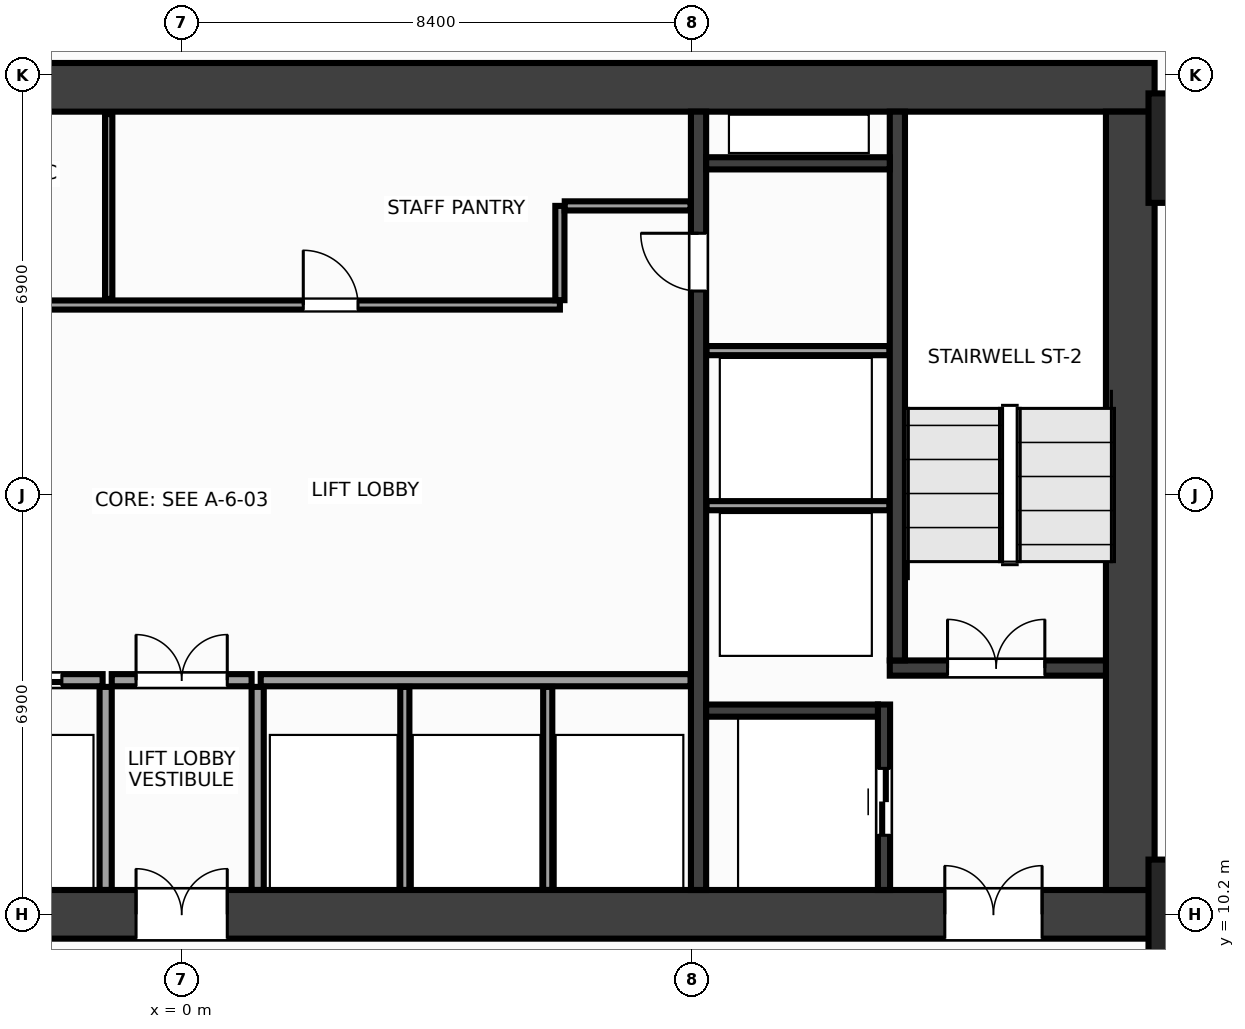
"""IFC4 building model, lengths in metres.
Left out: names, types, materials, properties, quantities, classifications, styles, units other than length and angle.
Written with IfcOpenShell. Run it as: python <this file> out.ifc"""

import sys

from ifc_helpers import new_model, si_unit, direction, frame, frame_2d, origin, origin_2d, place, context, subcontext, project, spatial, rectangle, extrude, source, transform, mapped, element, fill, save


model = new_model("IFC4")
c1 = context("Model", 3, precision=1e-05, world=origin(), true_north=direction((0.0, 1.0)))
c2 = subcontext(c1, "Body", "Model", "MODEL_VIEW")
j1 = project(units=[si_unit("LENGTHUNIT", "METRE"), si_unit("PLANEANGLEUNIT", "RADIAN")], contexts=[c1])
p1 = place(None, origin())
s1 = spatial("IfcSite", under=j1, at=p1, CompositionType="ELEMENT")
p2 = place(p1, origin())
s2 = spatial("IfcBuilding", under=s1, at=p2, CompositionType="ELEMENT")
p3 = place(p2, frame((0.0, 0.0, 63.2)))
s3 = spatial("IfcBuildingStorey", under=s2, at=p3, CompositionType="ELEMENT", Elevation=63.2)
m1 = source(origin(), c2, "Body", "SweptSolid", [
    extrude(rectangle(XDim=32.0, YDim=0.8, at=frame_2d((16.0, 0.0))), origin(), (0.0, 0.0, 1.0), 3.6),
])
p4 = place(p3, frame((-16.0, 23.8, 0.0), z_axis=(0.0, 0.0, 1.0), x_axis=(1.0, 0.0, 0.0)))
e1 = element("IfcWall", 1, at=p4, inside=s3, PredefinedType="SHEAR", context=c2, shape_type="MappedRepresentation", body=[
    mapped(m1, transform((0.0, 0.0, 0.0), x_axis=(1.0, 0.0, 0.0), y_axis=(0.0, 1.0, 0.0), z_axis=(0.0, 0.0, 1.0), scale=1.0)),
])
p5 = place(p3, frame((-16.0, 10.2, 0.0), z_axis=(0.0, 0.0, 1.0), x_axis=(1.0, 0.0, 0.0)))
e2 = element("IfcWall", 2, at=p5, inside=s3, PredefinedType="SHEAR", context=c2, shape_type="MappedRepresentation", body=[
    mapped(m1, transform((0.0, 0.0, 0.0), x_axis=(1.0, 0.0, 0.0), y_axis=(0.0, 1.0, 0.0), z_axis=(0.0, 0.0, 1.0), scale=1.0)),
])
p6 = place(p5, frame((1.85, 0.0, 0.0)))
e3 = element("IfcOpeningElement", 3, at=p6, cuts=e2, PredefinedType="OPENING", context=c2, shape_type="SweptSolid", body=[
    extrude(rectangle(XDim=1.6, YDim=2.15, at=frame_2d((0.8, 1.075))), frame((0.0, 0.412, 0.0), z_axis=(0.0, -1.0, 0.0), x_axis=(1.0, 0.0, 0.0)), (0.0, 0.0, 1.0), 0.824),
])
p7 = place(p5, frame((28.55, 0.0, 0.0)))
e4 = element("IfcOpeningElement", 4, at=p7, cuts=e2, PredefinedType="OPENING", context=c2, shape_type="SweptSolid", body=[
    extrude(rectangle(XDim=1.6, YDim=2.15, at=frame_2d((0.8, 1.075))), frame((0.0, 0.412, 0.0), z_axis=(0.0, -1.0, 0.0), x_axis=(1.0, 0.0, 0.0)), (0.0, 0.0, 1.0), 0.824),
])
p8 = place(p5, frame((15.25, 0.0, 0.0)))
e5 = element("IfcOpeningElement", 5, at=p8, cuts=e2, PredefinedType="OPENING", context=c2, shape_type="SweptSolid", body=[
    extrude(rectangle(XDim=1.5, YDim=2.2, at=frame_2d((0.75, 1.1))), frame((0.0, 0.412, 0.0), z_axis=(0.0, -1.0, 0.0), x_axis=(1.0, 0.0, 0.0)), (0.0, 0.0, 1.0), 0.824),
])
m2 = source(origin(), c2, "Body", "SweptSolid", [
    extrude(rectangle(XDim=12.8, YDim=0.8, at=frame_2d((6.4, 0.0))), origin(), (0.0, 0.0, 1.0), 3.6),
])
p9 = place(p3, frame((15.6, 10.6, 0.0), z_axis=(0.0, 0.0, 1.0), x_axis=(0.0, 1.0, 0.0)))
e6 = element("IfcWall", 6, at=p9, inside=s3, PredefinedType="SHEAR", context=c2, shape_type="MappedRepresentation", body=[
    mapped(m2, transform((0.0, 0.0, 0.0), x_axis=(1.0, 0.0, 0.0), y_axis=(0.0, 1.0, 0.0), z_axis=(0.0, 0.0, 1.0), scale=1.0)),
])
m3 = source(origin(), c2, "Body", "SweptSolid", [
    extrude(rectangle(XDim=12.8, YDim=0.25, at=frame_2d((6.4, 0.0))), origin(), (0.0, 0.0, 1.0), 3.6),
])
p10 = place(p3, frame((8.5, 10.6, 0.0), z_axis=(0.0, 0.0, 1.0), x_axis=(0.0, 1.0, 0.0)))
e7 = element("IfcWall", 7, at=p10, inside=s3, PredefinedType="SHEAR", context=c2, shape_type="MappedRepresentation", body=[
    mapped(m3, transform((0.0, 0.0, 0.0), x_axis=(1.0, 0.0, 0.0), y_axis=(0.0, 1.0, 0.0), z_axis=(0.0, 0.0, 1.0), scale=1.0)),
])
p11 = place(p10, frame((9.85, 0.0, 0.0)))
e8 = element("IfcOpeningElement", 8, at=p11, cuts=e7, PredefinedType="OPENING", context=c2, shape_type="SweptSolid", body=[
    extrude(rectangle(XDim=0.95, YDim=2.15, at=frame_2d((0.475, 1.075))), frame((0.0, 0.137, 0.0), z_axis=(0.0, -1.0, 0.0), x_axis=(1.0, 0.0, 0.0)), (0.0, 0.0, 1.0), 0.274),
])
m4 = source(origin(), c2, "Body", "SweptSolid", [
    extrude(rectangle(XDim=3.555, YDim=0.25, at=frame_2d((1.777, 0.0))), origin(), (0.0, 0.0, 1.0), 3.6),
])
p12 = place(p3, frame((11.645, 14.25, 0.0), z_axis=(0.0, 0.0, 1.0), x_axis=(1.0, 0.0, 0.0)))
e9 = element("IfcWall", 9, at=p12, inside=s3, PredefinedType="SHEAR", context=c2, shape_type="MappedRepresentation", body=[
    mapped(m4, transform((0.0, 0.0, 0.0), x_axis=(1.0, 0.0, 0.0), y_axis=(0.0, 1.0, 0.0), z_axis=(0.0, 0.0, 1.0), scale=1.0)),
])
p13 = place(p12, frame((0.95, 0.0, 0.0)))
e10 = element("IfcOpeningElement", 10, at=p13, cuts=e9, PredefinedType="OPENING", context=c2, shape_type="SweptSolid", body=[
    extrude(rectangle(XDim=1.6, YDim=2.15, at=frame_2d((0.8, 1.075))), frame((0.0, 0.137, 0.0), z_axis=(0.0, -1.0, 0.0), x_axis=(1.0, 0.0, 0.0)), (0.0, 0.0, 1.0), 0.274),
])
m5 = source(origin(), c2, "Body", "SweptSolid", [
    extrude(rectangle(XDim=9.025, YDim=0.25, at=frame_2d((4.512, 0.0))), origin(), (0.0, 0.0, 1.0), 3.6),
])
p14 = place(p3, frame((11.77, 14.375, 0.0), z_axis=(0.0, 0.0, 1.0), x_axis=(0.0, 1.0, 0.0)))
e11 = element("IfcWall", 11, at=p14, inside=s3, PredefinedType="SHEAR", context=c2, shape_type="MappedRepresentation", body=[
    mapped(m5, transform((0.0, 0.0, 0.0), x_axis=(1.0, 0.0, 0.0), y_axis=(0.0, 1.0, 0.0), z_axis=(0.0, 0.0, 1.0), scale=1.0)),
])
m6 = source(origin(), c2, "Body", "SweptSolid", [
    extrude(rectangle(XDim=3.05, YDim=0.2, at=frame_2d((1.525, 0.0))), origin(), (0.0, 0.0, 1.0), 3.6),
])
p15 = place(p3, frame((11.55, 10.6, 0.0), z_axis=(0.0, 0.0, 1.0), x_axis=(0.0, 1.0, 0.0)))
e12 = element("IfcWall", 12, at=p15, inside=s3, PredefinedType="SHEAR", context=c2, shape_type="MappedRepresentation", body=[
    mapped(m6, transform((0.0, 0.0, 0.0), x_axis=(1.0, 0.0, 0.0), y_axis=(0.0, 1.0, 0.0), z_axis=(0.0, 0.0, 1.0), scale=1.0)),
])
p16 = place(p15, frame((0.9, 0.0, 0.0)))
e13 = element("IfcOpeningElement", 13, at=p16, cuts=e12, PredefinedType="OPENING", context=c2, shape_type="SweptSolid", body=[
    extrude(rectangle(XDim=1.1, YDim=2.15, at=frame_2d((0.55, 1.075))), frame((0.0, 0.112, 0.0), z_axis=(0.0, -1.0, 0.0), x_axis=(1.0, 0.0, 0.0)), (0.0, 0.0, 1.0), 0.224),
])
m7 = source(origin(), c2, "Body", "SweptSolid", [
    extrude(rectangle(XDim=2.825, YDim=0.2, at=frame_2d((1.413, 0.0))), origin(), (0.0, 0.0, 1.0), 3.6),
])
p17 = place(p3, frame((8.625, 13.55, 0.0), z_axis=(0.0, 0.0, 1.0), x_axis=(1.0, 0.0, 0.0)))
e14 = element("IfcWall", 14, at=p17, inside=s3, PredefinedType="SHEAR", context=c2, shape_type="MappedRepresentation", body=[
    mapped(m7, transform((0.0, 0.0, 0.0), x_axis=(1.0, 0.0, 0.0), y_axis=(0.0, 1.0, 0.0), z_axis=(0.0, 0.0, 1.0), scale=1.0)),
])
m8 = source(origin(), c2, "Body", "SweptSolid", [
    extrude(rectangle(XDim=3.02, YDim=0.2, at=frame_2d((1.51, 0.0))), origin(), (0.0, 0.0, 1.0), 3.6),
])
p18 = place(p3, frame((8.625, 22.55, 0.0), z_axis=(0.0, 0.0, 1.0), x_axis=(1.0, 0.0, 0.0)))
e15 = element("IfcWall", 15, at=p18, inside=s3, PredefinedType="SHEAR", context=c2, shape_type="MappedRepresentation", body=[
    mapped(m8, transform((0.0, 0.0, 0.0), x_axis=(1.0, 0.0, 0.0), y_axis=(0.0, 1.0, 0.0), z_axis=(0.0, 0.0, 1.0), scale=1.0)),
])
m9 = source(origin(), c2, "Body", "SweptSolid", [
    extrude(rectangle(XDim=1.8, YDim=1.8, at=origin_2d()), origin(), (0.0, 0.0, 1.0), 3.6),
])
for number, where, z_axis, x_axis in (
    (16, (16.8, 10.2, 0.0), (0.0, 0.0, 1.0), (1.0, 0.0, 0.0)),
    (17, (16.8, 22.8, 0.0), (0.0, 0.0, 1.0), (1.0, 0.0, 0.0)),
):
    element("IfcColumn", number, at=place(p3, frame(where, z_axis=z_axis, x_axis=x_axis)), inside=s3, PredefinedType="COLUMN", context=c2, shape_type="MappedRepresentation", body=[
        mapped(m9, transform((0.0, 0.0, 0.0), x_axis=(1.0, 0.0, 0.0), y_axis=(0.0, 1.0, 0.0), z_axis=(0.0, 0.0, 1.0), scale=1.0)),
    ])
m10 = source(origin(), c2, "Body", "SweptSolid", [
    extrude(rectangle(XDim=3.01, YDim=0.15, at=frame_2d((1.505, 0.0))), origin(), (0.0, 0.0, 1.0), 3.36),
])
for number, where, z_axis, x_axis in (
    (18, (8.63, 16.92, 0.0), (0.0, 0.0, 1.0), (1.0, 0.0, 0.0)),
    (19, (8.63, 19.47, 0.0), (0.0, 0.0, 1.0), (1.0, 0.0, 0.0)),
):
    element("IfcWall", number, at=place(p3, frame(where, z_axis=z_axis, x_axis=x_axis)), inside=s3, PredefinedType="PARTITIONING", context=c2, shape_type="MappedRepresentation", body=[
        mapped(m10, transform((0.0, 0.0, 0.0), x_axis=(1.0, 0.0, 0.0), y_axis=(0.0, 1.0, 0.0), z_axis=(0.0, 0.0, 1.0), scale=1.0)),
    ])
m11 = source(origin(), c2, "Body", "SweptSolid", [
    extrude(rectangle(XDim=7.07, YDim=0.2, at=frame_2d((3.535, 0.0))), origin(), (0.0, 0.0, 1.0), 3.36),
])
p19 = place(p3, frame((-8.37, 14.05, 0.0), z_axis=(0.0, 0.0, 1.0), x_axis=(1.0, 0.0, 0.0)))
e20 = element("IfcWall", 20, at=p19, inside=s3, PredefinedType="PARTITIONING", context=c2, shape_type="MappedRepresentation", body=[
    mapped(m11, transform((0.0, 0.0, 0.0), x_axis=(1.0, 0.0, 0.0), y_axis=(0.0, 1.0, 0.0), z_axis=(0.0, 0.0, 1.0), scale=1.0)),
])
p20 = place(p19, frame((0.6, 0.0, 0.0)))
e21 = element("IfcOpeningElement", 21, at=p20, cuts=e20, PredefinedType="OPENING", context=c2, shape_type="SweptSolid", body=[
    extrude(rectangle(XDim=1.1, YDim=2.15, at=frame_2d((0.55, 1.075))), frame((0.0, 0.112, 0.0), z_axis=(0.0, -1.0, 0.0), x_axis=(1.0, 0.0, 0.0)), (0.0, 0.0, 1.0), 0.224),
])
p21 = place(p19, frame((2.95, 0.0, 0.0)))
e22 = element("IfcOpeningElement", 22, at=p21, cuts=e20, PredefinedType="OPENING", context=c2, shape_type="SweptSolid", body=[
    extrude(rectangle(XDim=1.1, YDim=2.15, at=frame_2d((0.55, 1.075))), frame((0.0, 0.112, 0.0), z_axis=(0.0, -1.0, 0.0), x_axis=(1.0, 0.0, 0.0)), (0.0, 0.0, 1.0), 0.224),
])
p22 = place(p19, frame((5.3, 0.0, 0.0)))
e23 = element("IfcOpeningElement", 23, at=p22, cuts=e20, PredefinedType="OPENING", context=c2, shape_type="SweptSolid", body=[
    extrude(rectangle(XDim=1.1, YDim=2.15, at=frame_2d((0.55, 1.075))), frame((0.0, 0.112, 0.0), z_axis=(0.0, -1.0, 0.0), x_axis=(1.0, 0.0, 0.0)), (0.0, 0.0, 1.0), 0.224),
])
p23 = place(p3, frame((1.3, 14.05, 0.0), z_axis=(0.0, 0.0, 1.0), x_axis=(1.0, 0.0, 0.0)))
e24 = element("IfcWall", 24, at=p23, inside=s3, PredefinedType="PARTITIONING", context=c2, shape_type="MappedRepresentation", body=[
    mapped(m11, transform((0.0, 0.0, 0.0), x_axis=(1.0, 0.0, 0.0), y_axis=(0.0, 1.0, 0.0), z_axis=(0.0, 0.0, 1.0), scale=1.0)),
])
m12 = source(origin(), c2, "Body", "SweptSolid", [
    extrude(rectangle(XDim=3.34, YDim=0.2, at=frame_2d((1.67, 0.0))), origin(), (0.0, 0.0, 1.0), 3.36),
])
for number, where, z_axis, x_axis in (
    (25, (-1.25, 10.6, 0.0), (0.0, 0.0, 1.0), (0.0, 1.0, 0.0)),
    (26, (1.25, 10.6, 0.0), (0.0, 0.0, 1.0), (0.0, 1.0, 0.0)),
):
    element("IfcWall", number, at=place(p3, frame(where, z_axis=z_axis, x_axis=x_axis)), inside=s3, PredefinedType="PARTITIONING", context=c2, shape_type="MappedRepresentation", body=[
        mapped(m12, transform((0.0, 0.0, 0.0), x_axis=(1.0, 0.0, 0.0), y_axis=(0.0, 1.0, 0.0), z_axis=(0.0, 0.0, 1.0), scale=1.0)),
    ])
m13 = source(origin(), c2, "Body", "SweptSolid", [
    extrude(rectangle(XDim=2.3, YDim=0.2, at=frame_2d((1.15, 0.0))), origin(), (0.0, 0.0, 1.0), 3.36),
])
p24 = place(p3, frame((-1.15, 14.05, 0.0), z_axis=(0.0, 0.0, 1.0), x_axis=(1.0, 0.0, 0.0)))
e27 = element("IfcWall", 27, at=p24, inside=s3, PredefinedType="PARTITIONING", context=c2, shape_type="MappedRepresentation", body=[
    mapped(m13, transform((0.0, 0.0, 0.0), x_axis=(1.0, 0.0, 0.0), y_axis=(0.0, 1.0, 0.0), z_axis=(0.0, 0.0, 1.0), scale=1.0)),
])
p25 = place(p24, frame((0.4, 0.0, 0.0)))
e28 = element("IfcOpeningElement", 28, at=p25, cuts=e27, PredefinedType="OPENING", context=c2, shape_type="SweptSolid", body=[
    extrude(rectangle(XDim=1.5, YDim=2.2, at=frame_2d((0.75, 1.1))), frame((0.0, 0.112, 0.0), z_axis=(0.0, -1.0, 0.0), x_axis=(1.0, 0.0, 0.0)), (0.0, 0.0, 1.0), 0.224),
])
m14 = source(origin(), c2, "Body", "SweptSolid", [
    extrude(rectangle(XDim=14.59, YDim=0.15, at=frame_2d((7.295, 0.0))), origin(), (0.0, 0.0, 1.0), 3.36),
])
p26 = place(p3, frame((-8.37, 20.22, 0.0), z_axis=(0.0, 0.0, 1.0), x_axis=(1.0, 0.0, 0.0)))
e29 = element("IfcWall", 29, at=p26, inside=s3, PredefinedType="PARTITIONING", context=c2, shape_type="MappedRepresentation", body=[
    mapped(m14, transform((0.0, 0.0, 0.0), x_axis=(1.0, 0.0, 0.0), y_axis=(0.0, 1.0, 0.0), z_axis=(0.0, 0.0, 1.0), scale=1.0)),
])
p27 = place(p26, frame((1.36, 0.0, 0.0)))
e30 = element("IfcOpeningElement", 30, at=p27, cuts=e29, PredefinedType="OPENING", context=c2, shape_type="SweptSolid", body=[
    extrude(rectangle(XDim=0.9, YDim=2.15, at=frame_2d((0.45, 1.075))), frame((0.0, 0.087, 0.0), z_axis=(0.0, -1.0, 0.0), x_axis=(1.0, 0.0, 0.0)), (0.0, 0.0, 1.0), 0.174),
])
p28 = place(p26, frame((4.92, 0.0, 0.0)))
e31 = element("IfcOpeningElement", 31, at=p28, cuts=e29, PredefinedType="OPENING", context=c2, shape_type="SweptSolid", body=[
    extrude(rectangle(XDim=0.9, YDim=2.15, at=frame_2d((0.45, 1.075))), frame((0.0, 0.087, 0.0), z_axis=(0.0, -1.0, 0.0), x_axis=(1.0, 0.0, 0.0)), (0.0, 0.0, 1.0), 0.174),
])
p29 = place(p26, frame((10.37, 0.0, 0.0)))
e32 = element("IfcOpeningElement", 32, at=p29, cuts=e29, PredefinedType="OPENING", context=c2, shape_type="SweptSolid", body=[
    extrude(rectangle(XDim=0.9, YDim=2.15, at=frame_2d((0.45, 1.075))), frame((0.0, 0.087, 0.0), z_axis=(0.0, -1.0, 0.0), x_axis=(1.0, 0.0, 0.0)), (0.0, 0.0, 1.0), 0.174),
])
m15 = source(origin(), c2, "Body", "SweptSolid", [
    extrude(rectangle(XDim=1.55, YDim=0.15, at=frame_2d((0.775, 0.0))), origin(), (0.0, 0.0, 1.0), 3.36),
])
p30 = place(p3, frame((6.22, 20.3, 0.0), z_axis=(0.0, 0.0, 1.0), x_axis=(0.0, 1.0, 0.0)))
e33 = element("IfcWall", 33, at=p30, inside=s3, PredefinedType="PARTITIONING", context=c2, shape_type="MappedRepresentation", body=[
    mapped(m15, transform((0.0, 0.0, 0.0), x_axis=(1.0, 0.0, 0.0), y_axis=(0.0, 1.0, 0.0), z_axis=(0.0, 0.0, 1.0), scale=1.0)),
])
m16 = source(origin(), c2, "Body", "SweptSolid", [
    extrude(rectangle(XDim=2.07, YDim=0.15, at=frame_2d((1.035, 0.0))), origin(), (0.0, 0.0, 1.0), 3.36),
])
p31 = place(p3, frame((6.3, 21.85, 0.0), z_axis=(0.0, 0.0, 1.0), x_axis=(1.0, 0.0, 0.0)))
e34 = element("IfcWall", 34, at=p31, inside=s3, PredefinedType="PARTITIONING", context=c2, shape_type="MappedRepresentation", body=[
    mapped(m16, transform((0.0, 0.0, 0.0), x_axis=(1.0, 0.0, 0.0), y_axis=(0.0, 1.0, 0.0), z_axis=(0.0, 0.0, 1.0), scale=1.0)),
])
m17 = source(origin(), c2, "Body", "SweptSolid", [
    extrude(rectangle(XDim=3.34, YDim=0.15, at=frame_2d((1.67, 0.0))), origin(), (0.0, 0.0, 1.0), 3.36),
])
for number, where, z_axis, x_axis in (
    (35, (3.67, 10.6, 0.0), (0.0, 0.0, 1.0), (0.0, 1.0, 0.0)),
    (36, (6.02, 10.6, 0.0), (0.0, 0.0, 1.0), (0.0, 1.0, 0.0)),
):
    element("IfcWall", number, at=place(p3, frame(where, z_axis=z_axis, x_axis=x_axis)), inside=s3, PredefinedType="PARTITIONING", context=c2, shape_type="MappedRepresentation", body=[
        mapped(m17, transform((0.0, 0.0, 0.0), x_axis=(1.0, 0.0, 0.0), y_axis=(0.0, 1.0, 0.0), z_axis=(0.0, 0.0, 1.0), scale=1.0)),
    ])
m18 = source(origin(), c2, "Body", "SweptSolid", [
    extrude(rectangle(XDim=3.04, YDim=0.12, at=frame_2d((1.52, 0.0))), origin(), (0.0, 0.0, 1.0), 3.36),
])
p32 = place(p3, frame((-1.2, 20.32, 0.0), z_axis=(0.0, 0.0, 1.0), x_axis=(0.0, 1.0, 0.0)))
e37 = element("IfcWall", 37, at=p32, inside=s3, PredefinedType="PARTITIONING", context=c2, shape_type="MappedRepresentation", body=[
    mapped(m18, transform((0.0, 0.0, 0.0), x_axis=(1.0, 0.0, 0.0), y_axis=(0.0, 1.0, 0.0), z_axis=(0.0, 0.0, 1.0), scale=1.0)),
])
m19 = source(origin(), c2, "Body", "SweptSolid", [
    extrude(rectangle(XDim=1.6, YDim=2.15, at=frame_2d((0.8, 1.075))), frame((0.0, 0.025, 0.0), z_axis=(0.0, -1.0, 0.0), x_axis=(1.0, 0.0, 0.0)), (0.0, 0.0, 1.0), 0.05),
])
p33 = place(p13, origin())
e38 = element("IfcDoor", 38, at=p33, inside=s3, OperationType="DOUBLE_DOOR_SINGLE_SWING", PredefinedType="DOOR", context=c2, shape_type="MappedRepresentation", body=[
    mapped(m19, transform((0.0, 0.0, 0.0), x_axis=(1.0, 0.0, 0.0), y_axis=(0.0, 1.0, 0.0), z_axis=(0.0, 0.0, 1.0), scale=1.0)),
])
fill(e10, e38)
p34 = place(p7, origin())
e39 = element("IfcDoor", 39, at=p34, inside=s3, OperationType="DOUBLE_DOOR_SINGLE_SWING", PredefinedType="DOOR", context=c2, shape_type="MappedRepresentation", body=[
    mapped(m19, transform((0.0, 0.0, 0.0), x_axis=(1.0, 0.0, 0.0), y_axis=(0.0, 1.0, 0.0), z_axis=(0.0, 0.0, 1.0), scale=1.0)),
])
fill(e4, e39)
m20 = source(origin(), c2, "Body", "SweptSolid", [
    extrude(rectangle(XDim=1.1, YDim=2.15, at=frame_2d((0.55, 1.075))), frame((0.0, 0.025, 0.0), z_axis=(0.0, -1.0, 0.0), x_axis=(1.0, 0.0, 0.0)), (0.0, 0.0, 1.0), 0.05),
])
p35 = place(p16, origin())
e40 = element("IfcDoor", 40, at=p35, inside=s3, OperationType="DOUBLE_DOOR_SLIDING", PredefinedType="DOOR", context=c2, shape_type="MappedRepresentation", body=[
    mapped(m20, transform((0.0, 0.0, 0.0), x_axis=(1.0, 0.0, 0.0), y_axis=(0.0, 1.0, 0.0), z_axis=(0.0, 0.0, 1.0), scale=1.0)),
])
fill(e13, e40)
m21 = source(origin(), c2, "Body", "SweptSolid", [
    extrude(rectangle(XDim=0.95, YDim=2.15, at=frame_2d((0.475, 1.075))), frame((0.0, 0.025, 0.0), z_axis=(0.0, -1.0, 0.0), x_axis=(1.0, 0.0, 0.0)), (0.0, 0.0, 1.0), 0.05),
])
p36 = place(p11, origin())
e41 = element("IfcDoor", 41, at=p36, inside=s3, OperationType="SINGLE_SWING_RIGHT", PredefinedType="DOOR", context=c2, shape_type="MappedRepresentation", body=[
    mapped(m21, transform((0.0, 0.0, 0.0), x_axis=(1.0, 0.0, 0.0), y_axis=(0.0, 1.0, 0.0), z_axis=(0.0, 0.0, 1.0), scale=1.0)),
])
fill(e8, e41)
p37 = place(p22, origin())
e42 = element("IfcDoor", 42, at=p37, inside=s3, OperationType="DOUBLE_DOOR_SLIDING", PredefinedType="DOOR", context=c2, shape_type="MappedRepresentation", body=[
    mapped(m20, transform((0.0, 0.0, 0.0), x_axis=(1.0, 0.0, 0.0), y_axis=(0.0, 1.0, 0.0), z_axis=(0.0, 0.0, 1.0), scale=1.0)),
])
fill(e23, e42)
m22 = source(origin(), c2, "Body", "SweptSolid", [
    extrude(rectangle(XDim=1.5, YDim=2.2, at=frame_2d((0.75, 1.1))), frame((0.0, 0.025, 0.0), z_axis=(0.0, -1.0, 0.0), x_axis=(1.0, 0.0, 0.0)), (0.0, 0.0, 1.0), 0.05),
])
p38 = place(p25, origin())
e43 = element("IfcDoor", 43, at=p38, inside=s3, OperationType="DOUBLE_DOOR_SINGLE_SWING", PredefinedType="DOOR", context=c2, shape_type="MappedRepresentation", body=[
    mapped(m22, transform((0.0, 0.0, 0.0), x_axis=(1.0, 0.0, 0.0), y_axis=(0.0, 1.0, 0.0), z_axis=(0.0, 0.0, 1.0), scale=1.0)),
])
fill(e28, e43)
p39 = place(p8, origin())
e44 = element("IfcDoor", 44, at=p39, inside=s3, OperationType="DOUBLE_DOOR_SINGLE_SWING", PredefinedType="DOOR", context=c2, shape_type="MappedRepresentation", body=[
    mapped(m22, transform((0.0, 0.0, 0.0), x_axis=(1.0, 0.0, 0.0), y_axis=(0.0, 1.0, 0.0), z_axis=(0.0, 0.0, 1.0), scale=1.0)),
])
fill(e5, e44)
m23 = source(origin(), c2, "Body", "SweptSolid", [
    extrude(rectangle(XDim=0.9, YDim=2.15, at=frame_2d((0.45, 1.075))), frame((0.0, 0.025, 0.0), z_axis=(0.0, -1.0, 0.0), x_axis=(1.0, 0.0, 0.0)), (0.0, 0.0, 1.0), 0.05),
])
p40 = place(p29, origin())
e45 = element("IfcDoor", 45, at=p40, inside=s3, OperationType="SINGLE_SWING_LEFT", PredefinedType="DOOR", context=c2, shape_type="MappedRepresentation", body=[
    mapped(m23, transform((0.0, 0.0, 0.0), x_axis=(1.0, 0.0, 0.0), y_axis=(0.0, 1.0, 0.0), z_axis=(0.0, 0.0, 1.0), scale=1.0)),
])
fill(e32, e45)
save(model, sys.argv[1])
